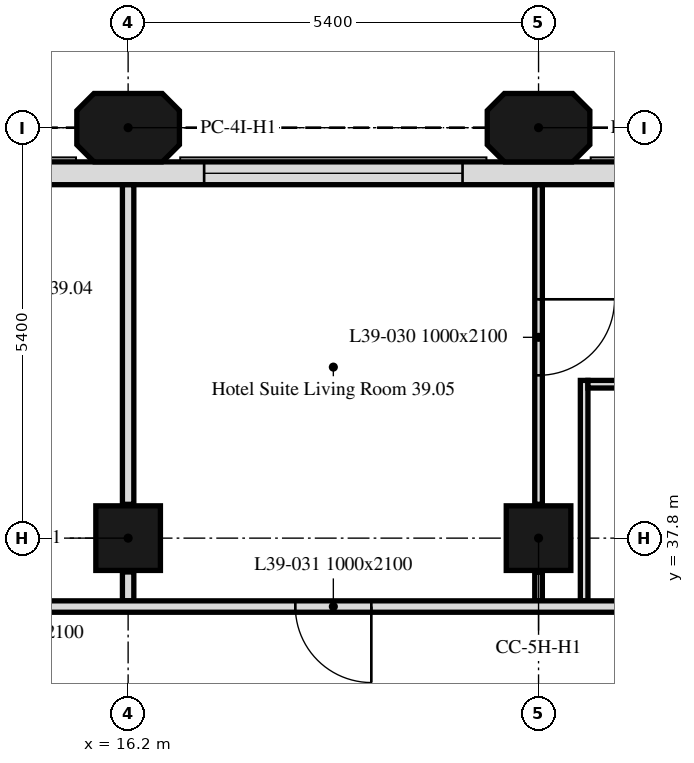
"""IFC4 building model, lengths in metres.
Left out: names, types, materials, properties, quantities, classifications, styles, units other than length and angle.
Written with IfcOpenShell. Run it as: python <this file> out.ifc"""

import sys

from ifc_helpers import new_model, si_unit, direction, frame, frame_2d, origin, origin_2d, place, context, subcontext, project, spatial, polyline, rectangle, outline, extrude, element, fill, save


model = new_model("IFC4")
c1 = context("Model", 3, precision=1e-05, world=origin(), true_north=direction((0.0, 1.0)))
c2 = subcontext(c1, "Body", "Model", "MODEL_VIEW")
j1 = project(units=[si_unit("LENGTHUNIT", "METRE"), si_unit("PLANEANGLEUNIT", "RADIAN")], contexts=[c1])
p1 = place(None, origin())
s1 = spatial("IfcSite", under=j1, at=p1, CompositionType="ELEMENT")
p2 = place(p1, origin())
s2 = spatial("IfcBuilding", under=s1, at=p2, CompositionType="ELEMENT")
p3 = place(p2, frame((0.0, 0.0, 166.0)))
s3 = spatial("IfcBuildingStorey", under=s2, at=p3, CompositionType="ELEMENT", Elevation=166.0)
for number, where, z_axis, x_axis in (
    (1, (16.2, 37.8, 0.0), (0.0, 0.0, 1.0), (1.0, 0.0, 0.0)),
    (2, (21.6, 37.8, 0.0), (0.0, 0.0, 1.0), (1.0, 0.0, 0.0)),
):
    element("IfcColumn", number, at=place(p3, frame(where, z_axis=z_axis, x_axis=x_axis)), inside=s3, PredefinedType="COLUMN", context=c2, shape_type="SweptSolid", body=[
        extrude(rectangle(XDim=0.85, YDim=0.85, at=origin_2d()), origin(), (0.0, 0.0, 1.0), 3.0),
    ])
for number, where, z_axis, x_axis in (
    (3, (16.2, 43.2, 0.0), (0.0, 0.0, 1.0), (1.0, 0.0, 0.0)),
    (4, (21.6, 43.2, 0.0), (0.0, 0.0, 1.0), (1.0, 0.0, 0.0)),
):
    element("IfcColumn", number, at=place(p3, frame(where, z_axis=z_axis, x_axis=x_axis)), inside=s3, PredefinedType="COLUMN", context=c2, shape_type="SweptSolid", body=[
        extrude(outline(polyline([(-0.45, -0.45), (0.45, -0.45), (0.675, -0.225), (0.675, 0.225), (0.45, 0.45), (-0.45, 0.45), (-0.675, 0.225), (-0.675, -0.225), (-0.45, -0.45)])), origin(), (0.0, 0.0, 1.0), 3.0),
    ])
p4 = place(p3, frame((43.014, 42.6, 0.0), z_axis=(0.0, 0.0, 1.0), x_axis=(-1.0, 0.0, 0.0)))
e5 = element("IfcWall", 5, at=p4, inside=s3, PredefinedType="SOLIDWALL", context=c2, shape_type="SweptSolid", body=[
    extrude(rectangle(XDim=32.027, YDim=0.3, at=frame_2d((16.014, 0.0))), origin(), (0.0, 0.0, 1.0), 3.0),
])
p5 = place(p4, frame((0.814, 0.0, 0.9)))
e6 = element("IfcOpeningElement", 6, at=p5, cuts=e5, PredefinedType="OPENING", context=c2, shape_type="SweptSolid", body=[
    extrude(rectangle(XDim=3.4, YDim=1.7, at=frame_2d((1.7, 0.85))), frame((0.0, 0.16, 0.0), z_axis=(0.0, -1.0, 0.0), x_axis=(1.0, 0.0, 0.0)), (0.0, 0.0, 1.0), 0.32),
])
p6 = place(p4, frame((6.564, 0.0, 0.9)))
e7 = element("IfcOpeningElement", 7, at=p6, cuts=e5, PredefinedType="OPENING", context=c2, shape_type="SweptSolid", body=[
    extrude(rectangle(XDim=1.1, YDim=1.7, at=frame_2d((0.55, 0.85))), frame((0.0, 0.16, 0.0), z_axis=(0.0, -1.0, 0.0), x_axis=(1.0, 0.0, 0.0)), (0.0, 0.0, 1.0), 0.32),
])
p7 = place(p4, frame((11.614, 0.0, 0.9)))
e8 = element("IfcOpeningElement", 8, at=p7, cuts=e5, PredefinedType="OPENING", context=c2, shape_type="SweptSolid", body=[
    extrude(rectangle(XDim=3.4, YDim=1.7, at=frame_2d((1.7, 0.85))), frame((0.0, 0.16, 0.0), z_axis=(0.0, -1.0, 0.0), x_axis=(1.0, 0.0, 0.0)), (0.0, 0.0, 1.0), 0.32),
])
p8 = place(p4, frame((17.364, 0.0, 0.9)))
e9 = element("IfcOpeningElement", 9, at=p8, cuts=e5, PredefinedType="OPENING", context=c2, shape_type="SweptSolid", body=[
    extrude(rectangle(XDim=1.1, YDim=1.7, at=frame_2d((0.55, 0.85))), frame((0.0, 0.16, 0.0), z_axis=(0.0, -1.0, 0.0), x_axis=(1.0, 0.0, 0.0)), (0.0, 0.0, 1.0), 0.32),
])
p9 = place(p4, frame((22.414, 0.0, 0.9)))
e10 = element("IfcOpeningElement", 10, at=p9, cuts=e5, PredefinedType="OPENING", context=c2, shape_type="SweptSolid", body=[
    extrude(rectangle(XDim=3.4, YDim=1.7, at=frame_2d((1.7, 0.85))), frame((0.0, 0.16, 0.0), z_axis=(0.0, -1.0, 0.0), x_axis=(1.0, 0.0, 0.0)), (0.0, 0.0, 1.0), 0.32),
])
p10 = place(p4, frame((28.164, 0.0, 0.9)))
e11 = element("IfcOpeningElement", 11, at=p10, cuts=e5, PredefinedType="OPENING", context=c2, shape_type="SweptSolid", body=[
    extrude(rectangle(XDim=1.1, YDim=1.7, at=frame_2d((0.55, 0.85))), frame((0.0, 0.16, 0.0), z_axis=(0.0, -1.0, 0.0), x_axis=(1.0, 0.0, 0.0)), (0.0, 0.0, 1.0), 0.32),
])
p11 = place(p3, frame((16.2, 36.975, 0.0), z_axis=(0.0, 0.0, 1.0), x_axis=(0.0, 1.0, 0.0)))
e12 = element("IfcWall", 12, at=p11, inside=s3, PredefinedType="PARTITIONING", context=c2, shape_type="SweptSolid", body=[
    extrude(rectangle(XDim=0.38, YDim=0.15, at=frame_2d((0.19, 0.0))), origin(), (0.0, 0.0, 1.0), 3.0),
])
p12 = place(p3, frame((16.2, 38.245, 0.0), z_axis=(0.0, 0.0, 1.0), x_axis=(0.0, 1.0, 0.0)))
e13 = element("IfcWall", 13, at=p12, inside=s3, PredefinedType="PARTITIONING", context=c2, shape_type="SweptSolid", body=[
    extrude(rectangle(XDim=4.204, YDim=0.15, at=frame_2d((2.102, 0.0))), origin(), (0.0, 0.0, 1.0), 3.0),
])
p13 = place(p3, frame((21.6, 42.449, 0.0), z_axis=(0.0, 0.0, 1.0), x_axis=(0.0, -1.0, 0.0)))
e14 = element("IfcWall", 14, at=p13, inside=s3, PredefinedType="PARTITIONING", context=c2, shape_type="SweptSolid", body=[
    extrude(rectangle(XDim=4.204, YDim=0.1, at=frame_2d((2.102, 0.0))), origin(), (0.0, 0.0, 1.0), 3.0),
])
p14 = place(p13, frame((1.507, 0.0, 0.0)))
e15 = element("IfcOpeningElement", 15, at=p14, cuts=e14, PredefinedType="OPENING", context=c2, shape_type="SweptSolid", body=[
    extrude(rectangle(XDim=1.0, YDim=2.1, at=frame_2d((0.5, 1.05))), frame((0.0, 0.05, 0.0), z_axis=(0.0, -1.0, 0.0), x_axis=(1.0, 0.0, 0.0)), (0.0, 0.0, 1.0), 0.1),
])
p15 = place(p3, frame((21.6, 37.355, 0.0), z_axis=(0.0, 0.0, 1.0), x_axis=(0.0, -1.0, 0.0)))
e16 = element("IfcWall", 16, at=p15, inside=s3, PredefinedType="PARTITIONING", context=c2, shape_type="SweptSolid", body=[
    extrude(rectangle(XDim=0.38, YDim=0.1, at=frame_2d((0.19, 0.0))), origin(), (0.0, 0.0, 1.0), 3.0),
])
p16 = place(p3, frame((22.2, 36.975, 0.0), z_axis=(0.0, 0.0, 1.0), x_axis=(0.0, 1.0, 0.0)))
e17 = element("IfcWall", 17, at=p16, inside=s3, PredefinedType="PARTITIONING", context=c2, shape_type="SweptSolid", body=[
    extrude(rectangle(XDim=2.9, YDim=0.1, at=frame_2d((1.45, 0.0))), origin(), (0.0, 0.0, 1.0), 3.0),
])
p17 = place(p3, frame((22.25, 39.825, 0.0), z_axis=(0.0, 0.0, 1.0), x_axis=(1.0, 0.0, 0.0)))
e18 = element("IfcWall", 18, at=p17, inside=s3, PredefinedType="PARTITIONING", context=c2, shape_type="SweptSolid", body=[
    extrude(rectangle(XDim=2.4, YDim=0.1, at=frame_2d((1.2, 0.0))), origin(), (0.0, 0.0, 1.0), 3.0),
])
p18 = place(p3, frame((47.849, 36.9, 0.0), z_axis=(0.0, 0.0, 1.0), x_axis=(-1.0, 0.0, 0.0)))
e19 = element("IfcWall", 19, at=p18, inside=s3, PredefinedType="PARTITIONING", context=c2, shape_type="SweptSolid", body=[
    extrude(rectangle(XDim=41.698, YDim=0.15, at=frame_2d((20.849, 0.0))), origin(), (0.0, 0.0, 1.0), 3.0),
])
p19 = place(p18, frame((39.249, 0.0, 0.0)))
e20 = element("IfcOpeningElement", 20, at=p19, cuts=e19, PredefinedType="OPENING", context=c2, shape_type="SweptSolid", body=[
    extrude(rectangle(XDim=1.0, YDim=2.1, at=frame_2d((0.5, 1.05))), frame((0.0, 0.075, 0.0), z_axis=(0.0, -1.0, 0.0), x_axis=(1.0, 0.0, 0.0)), (0.0, 0.0, 1.0), 0.15),
])
p20 = place(p18, frame((28.449, 0.0, 0.0)))
e21 = element("IfcOpeningElement", 21, at=p20, cuts=e19, PredefinedType="OPENING", context=c2, shape_type="SweptSolid", body=[
    extrude(rectangle(XDim=1.0, YDim=2.1, at=frame_2d((0.5, 1.05))), frame((0.0, 0.075, 0.0), z_axis=(0.0, -1.0, 0.0), x_axis=(1.0, 0.0, 0.0)), (0.0, 0.0, 1.0), 0.15),
])
p21 = place(p18, frame((16.849, 0.0, 0.0)))
e22 = element("IfcOpeningElement", 22, at=p21, cuts=e19, PredefinedType="OPENING", context=c2, shape_type="SweptSolid", body=[
    extrude(rectangle(XDim=1.0, YDim=2.1, at=frame_2d((0.5, 1.05))), frame((0.0, 0.075, 0.0), z_axis=(0.0, -1.0, 0.0), x_axis=(1.0, 0.0, 0.0)), (0.0, 0.0, 1.0), 0.15),
])
p22 = place(p18, frame((11.449, 0.0, 0.0)))
e23 = element("IfcOpeningElement", 23, at=p22, cuts=e19, PredefinedType="OPENING", context=c2, shape_type="SweptSolid", body=[
    extrude(rectangle(XDim=1.0, YDim=2.1, at=frame_2d((0.5, 1.05))), frame((0.0, 0.075, 0.0), z_axis=(0.0, -1.0, 0.0), x_axis=(1.0, 0.0, 0.0)), (0.0, 0.0, 1.0), 0.15),
])
p23 = place(p18, frame((2.744, 0.0, 0.0)))
e24 = element("IfcOpeningElement", 24, at=p23, cuts=e19, PredefinedType="OPENING", context=c2, shape_type="SweptSolid", body=[
    extrude(rectangle(XDim=1.0, YDim=2.1, at=frame_2d((0.5, 1.05))), frame((0.0, 0.075, 0.0), z_axis=(0.0, -1.0, 0.0), x_axis=(1.0, 0.0, 0.0)), (0.0, 0.0, 1.0), 0.15),
])
p24 = place(p9, origin())
e25 = element("IfcWindow", 25, at=p24, inside=s3, PartitioningType="SINGLE_PANEL", PredefinedType="WINDOW", context=c2, shape_type="SweptSolid", body=[
    extrude(rectangle(XDim=3.4, YDim=1.7, at=frame_2d((1.7, 0.85))), frame((0.0, 0.03, 0.0), z_axis=(0.0, -1.0, 0.0), x_axis=(1.0, 0.0, 0.0)), (0.0, 0.0, 1.0), 0.06),
])
fill(e10, e25)
p25 = place(p14, origin())
e26 = element("IfcDoor", 26, at=p25, inside=s3, OperationType="SINGLE_SWING_RIGHT", PredefinedType="DOOR", context=c2, shape_type="SweptSolid", body=[
    extrude(rectangle(XDim=1.0, YDim=2.1, at=frame_2d((0.5, 1.05))), frame((0.0, 0.025, 0.0), z_axis=(0.0, -1.0, 0.0), x_axis=(1.0, 0.0, 0.0)), (0.0, 0.0, 1.0), 0.05),
])
fill(e15, e26)
p26 = place(p20, origin())
e27 = element("IfcDoor", 27, at=p26, inside=s3, OperationType="SINGLE_SWING_RIGHT", PredefinedType="DOOR", context=c2, shape_type="SweptSolid", body=[
    extrude(rectangle(XDim=1.0, YDim=2.1, at=frame_2d((0.5, 1.05))), frame((0.0, 0.025, 0.0), z_axis=(0.0, -1.0, 0.0), x_axis=(1.0, 0.0, 0.0)), (0.0, 0.0, 1.0), 0.05),
])
fill(e21, e27)
save(model, sys.argv[1])
